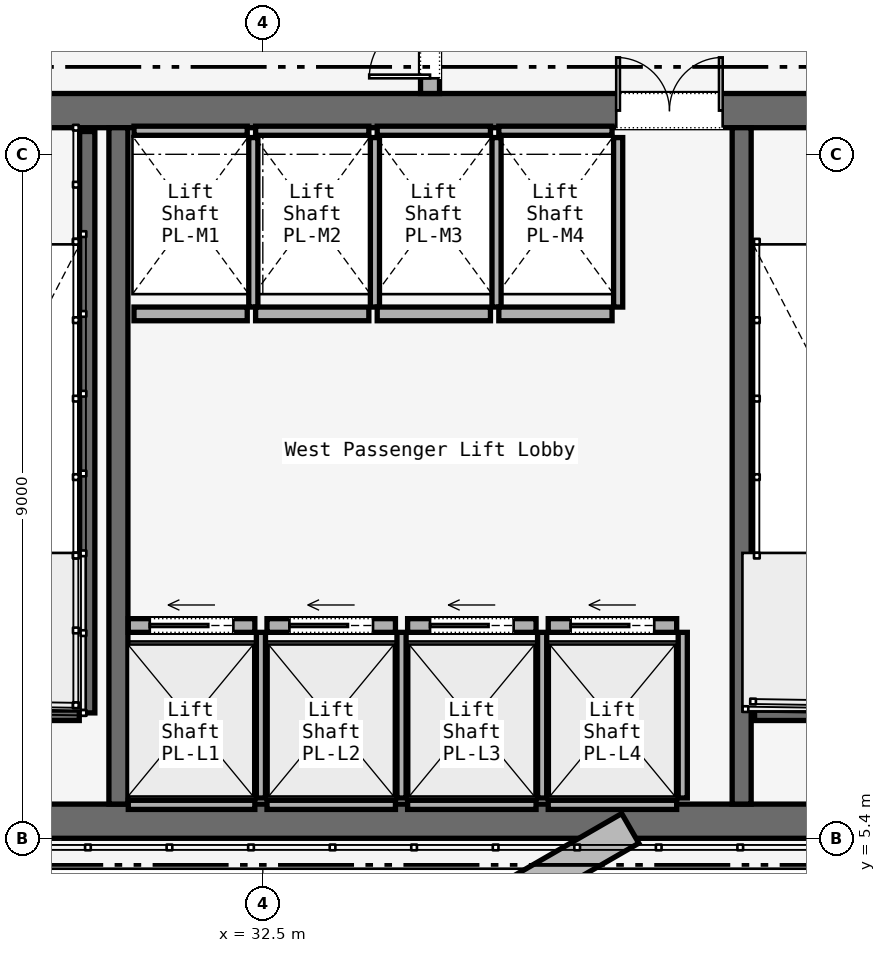
"""IFC4 building model, lengths in metres.
Left out: names, types, materials, properties, quantities, classifications, styles, units other than length and angle.
Written with IfcOpenShell. Run it as: python <this file> out.ifc"""

import sys

from ifc_helpers import new_model, si_unit, direction, frame, frame_2d, origin, place, context, subcontext, project, spatial, rectangle, extrude, element, fill, save


model = new_model("IFC4")
c1 = context("Model", 3, precision=1e-05, world=origin(), true_north=direction((0.0, 1.0)))
c2 = subcontext(c1, "Body", "Model", "MODEL_VIEW")
j1 = project(units=[si_unit("LENGTHUNIT", "METRE"), si_unit("PLANEANGLEUNIT", "RADIAN")], contexts=[c1])
p1 = place(None, origin())
s1 = spatial("IfcSite", under=j1, at=p1, CompositionType="ELEMENT")
p2 = place(p1, origin())
s2 = spatial("IfcBuilding", under=s1, at=p2, CompositionType="ELEMENT")
p3 = place(p2, frame((0.0, 0.0, 112.0)))
s3 = spatial("IfcBuildingStorey", under=s2, at=p3, CompositionType="ELEMENT", Elevation=112.0)
p4 = place(p3, frame((26.45, 14.975, 0.0), z_axis=(0.0, 0.0, 1.0), x_axis=(1.0, 0.0, 0.0)))
e1 = element("IfcWall", 1, at=p4, inside=s3, PredefinedType="SOLIDWALL", context=c2, shape_type="SweptSolid", body=[
    extrude(rectangle(XDim=31.1, YDim=0.45, at=frame_2d((15.55, 0.0))), origin(), (0.0, 0.0, 1.0), 5.12),
])
p5 = place(p4, frame((1.65, 0.0, 0.0)))
e2 = element("IfcOpeningElement", 2, at=p5, cuts=e1, PredefinedType="OPENING", context=c2, shape_type="SweptSolid", body=[
    extrude(rectangle(XDim=1.1, YDim=2.2, at=frame_2d((0.55, 1.1))), frame((0.0, 0.225, 0.0), z_axis=(0.0, -1.0, 0.0), x_axis=(1.0, 0.0, 0.0)), (0.0, 0.0, 1.0), 0.45),
])
p6 = place(p4, frame((13.65, 0.0, 0.0)))
e3 = element("IfcOpeningElement", 3, at=p6, cuts=e1, PredefinedType="OPENING", context=c2, shape_type="SweptSolid", body=[
    extrude(rectangle(XDim=1.1, YDim=2.2, at=frame_2d((0.55, 1.1))), frame((0.0, 0.225, 0.0), z_axis=(0.0, -1.0, 0.0), x_axis=(1.0, 0.0, 0.0)), (0.0, 0.0, 1.0), 0.45),
])
p7 = place(p4, frame((25.55, 0.0, 0.0)))
e4 = element("IfcOpeningElement", 4, at=p7, cuts=e1, PredefinedType="OPENING", context=c2, shape_type="SweptSolid", body=[
    extrude(rectangle(XDim=1.1, YDim=2.2, at=frame_2d((0.55, 1.1))), frame((0.0, 0.225, 0.0), z_axis=(0.0, -1.0, 0.0), x_axis=(1.0, 0.0, 0.0)), (0.0, 0.0, 1.0), 0.45),
])
p8 = place(p4, frame((10.7, 0.0, 0.0)))
e5 = element("IfcOpeningElement", 5, at=p8, cuts=e1, PredefinedType="OPENING", context=c2, shape_type="SweptSolid", body=[
    extrude(rectangle(XDim=1.4, YDim=2.2, at=frame_2d((0.7, 1.1))), frame((0.0, 0.225, 0.0), z_axis=(0.0, -1.0, 0.0), x_axis=(1.0, 0.0, 0.0)), (0.0, 0.0, 1.0), 0.45),
])
p9 = place(p4, frame((19.35, 0.0, 0.0)))
e6 = element("IfcOpeningElement", 6, at=p9, cuts=e1, PredefinedType="OPENING", context=c2, shape_type="SweptSolid", body=[
    extrude(rectangle(XDim=1.1, YDim=2.2, at=frame_2d((0.55, 1.1))), frame((0.0, 0.225, 0.0), z_axis=(0.0, -1.0, 0.0), x_axis=(1.0, 0.0, 0.0)), (0.0, 0.0, 1.0), 0.45),
])
p10 = place(p4, frame((21.4, 0.0, 0.0)))
e7 = element("IfcOpeningElement", 7, at=p10, cuts=e1, PredefinedType="OPENING", context=c2, shape_type="SweptSolid", body=[
    extrude(rectangle(XDim=0.9, YDim=2.1, at=frame_2d((0.45, 1.05))), frame((0.0, 0.225, 0.0), z_axis=(0.0, -1.0, 0.0), x_axis=(1.0, 0.0, 0.0)), (0.0, 0.0, 1.0), 0.45),
])
p11 = place(p4, frame((23.35, 0.0, 0.0)))
e8 = element("IfcOpeningElement", 8, at=p11, cuts=e1, PredefinedType="OPENING", context=c2, shape_type="SweptSolid", body=[
    extrude(rectangle(XDim=1.3, YDim=2.3, at=frame_2d((0.65, 1.15))), frame((0.0, 0.225, 0.0), z_axis=(0.0, -1.0, 0.0), x_axis=(1.0, 0.0, 0.0)), (0.0, 0.0, 1.0), 0.45),
])
p12 = place(p3, frame((26.45, 5.625, 0.0), z_axis=(0.0, 0.0, 1.0), x_axis=(1.0, 0.0, 0.0)))
e9 = element("IfcWall", 9, at=p12, inside=s3, PredefinedType="SOLIDWALL", context=c2, shape_type="SweptSolid", body=[
    extrude(rectangle(XDim=31.1, YDim=0.45, at=frame_2d((15.55, 0.0))), origin(), (0.0, 0.0, 1.0), 5.12),
])
for number, where, z_axis, x_axis in (
    (10, (30.6, 5.85, 0.0), (0.0, 0.0, 1.0), (0.0, 1.0, 0.0)),
    (11, (38.8, 5.85, 0.0), (0.0, 0.0, 1.0), (0.0, 1.0, 0.0)),
):
    element("IfcWall", number, at=place(p3, frame(where, z_axis=z_axis, x_axis=x_axis)), inside=s3, PredefinedType="SOLIDWALL", context=c2, shape_type="SweptSolid", body=[
        extrude(rectangle(XDim=8.9, YDim=0.25, at=frame_2d((4.45, 0.0))), origin(), (0.0, 0.0, 1.0), 5.12),
    ])
p13 = place(p3, frame((34.7, 15.2, 0.0), z_axis=(0.0, 0.0, 1.0), x_axis=(0.0, 1.0, 0.0)))
e12 = element("IfcWall", 12, at=p13, inside=s3, PredefinedType="SOLIDWALL", context=c2, shape_type="SweptSolid", body=[
    extrude(rectangle(XDim=19.8, YDim=0.25, at=frame_2d((9.9, 0.0))), origin(), (0.0, 0.0, 1.0), 3.99),
])
p14 = place(p13, frame((0.2, 0.0, 0.0)))
e13 = element("IfcOpeningElement", 13, at=p14, cuts=e12, PredefinedType="OPENING", context=c2, shape_type="SweptSolid", body=[
    extrude(rectangle(XDim=1.6, YDim=2.3, at=frame_2d((0.8, 1.15))), frame((0.0, 0.125, 0.0), z_axis=(0.0, -1.0, 0.0), x_axis=(1.0, 0.0, 0.0)), (0.0, 0.0, 1.0), 0.25),
])
p15 = place(p3, frame((30.19, 14.7, 0.0), z_axis=(0.0, 0.0, 1.0), x_axis=(0.0, -1.0, 0.0)))
e14 = element("IfcWall", 14, at=p15, inside=s3, PredefinedType="SOLIDWALL", context=c2, shape_type="SweptSolid", body=[
    extrude(rectangle(XDim=7.65, YDim=0.2, at=frame_2d((3.825, 0.0))), origin(), (0.0, 0.0, 1.0), 5.4),
])
for number, where, z_axis, x_axis in (
    (15, (26.97, 7.05, 0.0), (0.0, 0.0, 1.0), (1.0, 0.0, 0.0)),
    (16, (38.97, 7.05, 0.0), (0.0, 0.0, 1.0), (1.0, 0.0, 0.0)),
):
    element("IfcWall", number, at=place(p3, frame(where, z_axis=z_axis, x_axis=x_axis)), inside=s3, PredefinedType="SOLIDWALL", context=c2, shape_type="SweptSolid", body=[
        extrude(rectangle(XDim=3.115, YDim=0.2, at=frame_2d((1.558, 0.0))), origin(), (0.0, 0.0, 1.0), 5.4),
    ])
p16 = place(p3, frame((30.73, 8.2, 0.0), z_axis=(0.0, 0.0, 1.0), x_axis=(1.0, 0.0, 0.0)))
e17 = element("IfcWall", 17, at=p16, inside=s3, PredefinedType="SOLIDWALL", context=c2, shape_type="SweptSolid", body=[
    extrude(rectangle(XDim=1.665, YDim=0.18, at=frame_2d((0.833, 0.0))), origin(), (0.0, 0.0, 1.0), 3.99),
])
p17 = place(p16, frame((0.282, 0.0, 0.0)))
e18 = element("IfcOpeningElement", 18, at=p17, cuts=e17, PredefinedType="OPENING", context=c2, shape_type="SweptSolid", body=[
    extrude(rectangle(XDim=1.1, YDim=2.2, at=frame_2d((0.55, 1.1))), frame((0.0, 0.09, 0.0), z_axis=(0.0, -1.0, 0.0), x_axis=(1.0, 0.0, 0.0)), (0.0, 0.0, 1.0), 0.18),
])
p18 = place(p3, frame((30.73, 5.84, 0.0), z_axis=(0.0, 0.0, 1.0), x_axis=(1.0, 0.0, 0.0)))
e19 = element("IfcWall", 19, at=p18, inside=s3, PredefinedType="SOLIDWALL", context=c2, shape_type="SweptSolid", body=[
    extrude(rectangle(XDim=1.665, YDim=0.12, at=frame_2d((0.833, 0.0))), origin(), (0.0, 0.0, 1.0), 3.99),
])
p19 = place(p3, frame((32.475, 5.93, 0.0), z_axis=(0.0, 0.0, 1.0), x_axis=(0.0, 1.0, 0.0)))
e20 = element("IfcWall", 20, at=p19, inside=s3, PredefinedType="SOLIDWALL", context=c2, shape_type="SweptSolid", body=[
    extrude(rectangle(XDim=2.18, YDim=0.12, at=frame_2d((1.09, 0.0))), origin(), (0.0, 0.0, 1.0), 3.99),
])
p20 = place(p3, frame((32.555, 8.2, 0.0), z_axis=(0.0, 0.0, 1.0), x_axis=(1.0, 0.0, 0.0)))
e21 = element("IfcWall", 21, at=p20, inside=s3, PredefinedType="SOLIDWALL", context=c2, shape_type="SweptSolid", body=[
    extrude(rectangle(XDim=1.69, YDim=0.18, at=frame_2d((0.845, 0.0))), origin(), (0.0, 0.0, 1.0), 3.99),
])
p21 = place(p20, frame((0.295, 0.0, 0.0)))
e22 = element("IfcOpeningElement", 22, at=p21, cuts=e21, PredefinedType="OPENING", context=c2, shape_type="SweptSolid", body=[
    extrude(rectangle(XDim=1.1, YDim=2.2, at=frame_2d((0.55, 1.1))), frame((0.0, 0.09, 0.0), z_axis=(0.0, -1.0, 0.0), x_axis=(1.0, 0.0, 0.0)), (0.0, 0.0, 1.0), 0.18),
])
p22 = place(p3, frame((32.555, 5.84, 0.0), z_axis=(0.0, 0.0, 1.0), x_axis=(1.0, 0.0, 0.0)))
e23 = element("IfcWall", 23, at=p22, inside=s3, PredefinedType="SOLIDWALL", context=c2, shape_type="SweptSolid", body=[
    extrude(rectangle(XDim=1.69, YDim=0.12, at=frame_2d((0.845, 0.0))), origin(), (0.0, 0.0, 1.0), 3.99),
])
p23 = place(p3, frame((34.325, 5.93, 0.0), z_axis=(0.0, 0.0, 1.0), x_axis=(0.0, 1.0, 0.0)))
e24 = element("IfcWall", 24, at=p23, inside=s3, PredefinedType="SOLIDWALL", context=c2, shape_type="SweptSolid", body=[
    extrude(rectangle(XDim=2.18, YDim=0.12, at=frame_2d((1.09, 0.0))), origin(), (0.0, 0.0, 1.0), 3.99),
])
p24 = place(p3, frame((34.405, 8.2, 0.0), z_axis=(0.0, 0.0, 1.0), x_axis=(1.0, 0.0, 0.0)))
e25 = element("IfcWall", 25, at=p24, inside=s3, PredefinedType="SOLIDWALL", context=c2, shape_type="SweptSolid", body=[
    extrude(rectangle(XDim=1.69, YDim=0.18, at=frame_2d((0.845, 0.0))), origin(), (0.0, 0.0, 1.0), 3.99),
])
p25 = place(p24, frame((0.295, 0.0, 0.0)))
e26 = element("IfcOpeningElement", 26, at=p25, cuts=e25, PredefinedType="OPENING", context=c2, shape_type="SweptSolid", body=[
    extrude(rectangle(XDim=1.1, YDim=2.2, at=frame_2d((0.55, 1.1))), frame((0.0, 0.09, 0.0), z_axis=(0.0, -1.0, 0.0), x_axis=(1.0, 0.0, 0.0)), (0.0, 0.0, 1.0), 0.18),
])
p26 = place(p3, frame((34.405, 5.84, 0.0), z_axis=(0.0, 0.0, 1.0), x_axis=(1.0, 0.0, 0.0)))
e27 = element("IfcWall", 27, at=p26, inside=s3, PredefinedType="SOLIDWALL", context=c2, shape_type="SweptSolid", body=[
    extrude(rectangle(XDim=1.69, YDim=0.12, at=frame_2d((0.845, 0.0))), origin(), (0.0, 0.0, 1.0), 3.99),
])
p27 = place(p3, frame((36.175, 5.93, 0.0), z_axis=(0.0, 0.0, 1.0), x_axis=(0.0, 1.0, 0.0)))
e28 = element("IfcWall", 28, at=p27, inside=s3, PredefinedType="SOLIDWALL", context=c2, shape_type="SweptSolid", body=[
    extrude(rectangle(XDim=2.18, YDim=0.12, at=frame_2d((1.09, 0.0))), origin(), (0.0, 0.0, 1.0), 3.99),
])
p28 = place(p3, frame((36.255, 8.2, 0.0), z_axis=(0.0, 0.0, 1.0), x_axis=(1.0, 0.0, 0.0)))
e29 = element("IfcWall", 29, at=p28, inside=s3, PredefinedType="SOLIDWALL", context=c2, shape_type="SweptSolid", body=[
    extrude(rectangle(XDim=1.69, YDim=0.18, at=frame_2d((0.845, 0.0))), origin(), (0.0, 0.0, 1.0), 3.99),
])
p29 = place(p28, frame((0.295, 0.0, 0.0)))
e30 = element("IfcOpeningElement", 30, at=p29, cuts=e29, PredefinedType="OPENING", context=c2, shape_type="SweptSolid", body=[
    extrude(rectangle(XDim=1.1, YDim=2.2, at=frame_2d((0.55, 1.1))), frame((0.0, 0.09, 0.0), z_axis=(0.0, -1.0, 0.0), x_axis=(1.0, 0.0, 0.0)), (0.0, 0.0, 1.0), 0.18),
])
p30 = place(p3, frame((36.255, 5.84, 0.0), z_axis=(0.0, 0.0, 1.0), x_axis=(1.0, 0.0, 0.0)))
e31 = element("IfcWall", 31, at=p30, inside=s3, PredefinedType="SOLIDWALL", context=c2, shape_type="SweptSolid", body=[
    extrude(rectangle(XDim=1.69, YDim=0.12, at=frame_2d((0.845, 0.0))), origin(), (0.0, 0.0, 1.0), 3.99),
])
p31 = place(p3, frame((38.025, 5.93, 0.0), z_axis=(0.0, 0.0, 1.0), x_axis=(0.0, 1.0, 0.0)))
e32 = element("IfcWall", 32, at=p31, inside=s3, PredefinedType="SOLIDWALL", context=c2, shape_type="SweptSolid", body=[
    extrude(rectangle(XDim=2.18, YDim=0.12, at=frame_2d((1.09, 0.0))), origin(), (0.0, 0.0, 1.0), 3.99),
])
p32 = place(p3, frame((30.805, 12.3, 0.0), z_axis=(0.0, 0.0, 1.0), x_axis=(1.0, 0.0, 0.0)))
e33 = element("IfcWall", 33, at=p32, inside=s3, PredefinedType="SOLIDWALL", context=c2, shape_type="SweptSolid", body=[
    extrude(rectangle(XDim=1.49, YDim=0.18, at=frame_2d((0.745, 0.0))), origin(), (0.0, 0.0, 1.0), 3.99),
])
p33 = place(p3, frame((30.805, 14.71, 0.0), z_axis=(0.0, 0.0, 1.0), x_axis=(1.0, 0.0, 0.0)))
e34 = element("IfcWall", 34, at=p33, inside=s3, PredefinedType="SOLIDWALL", context=c2, shape_type="SweptSolid", body=[
    extrude(rectangle(XDim=1.49, YDim=0.12, at=frame_2d((0.745, 0.0))), origin(), (0.0, 0.0, 1.0), 3.99),
])
p34 = place(p3, frame((32.375, 12.39, 0.0), z_axis=(0.0, 0.0, 1.0), x_axis=(0.0, 1.0, 0.0)))
e35 = element("IfcWall", 35, at=p34, inside=s3, PredefinedType="SOLIDWALL", context=c2, shape_type="SweptSolid", body=[
    extrude(rectangle(XDim=2.23, YDim=0.12, at=frame_2d((1.115, 0.0))), origin(), (0.0, 0.0, 1.0), 3.99),
])
p35 = place(p3, frame((32.405, 12.3, 0.0), z_axis=(0.0, 0.0, 1.0), x_axis=(1.0, 0.0, 0.0)))
e36 = element("IfcWall", 36, at=p35, inside=s3, PredefinedType="SOLIDWALL", context=c2, shape_type="SweptSolid", body=[
    extrude(rectangle(XDim=1.49, YDim=0.18, at=frame_2d((0.745, 0.0))), origin(), (0.0, 0.0, 1.0), 3.99),
])
p36 = place(p3, frame((32.405, 14.71, 0.0), z_axis=(0.0, 0.0, 1.0), x_axis=(1.0, 0.0, 0.0)))
e37 = element("IfcWall", 37, at=p36, inside=s3, PredefinedType="SOLIDWALL", context=c2, shape_type="SweptSolid", body=[
    extrude(rectangle(XDim=1.49, YDim=0.12, at=frame_2d((0.745, 0.0))), origin(), (0.0, 0.0, 1.0), 3.99),
])
p37 = place(p3, frame((33.975, 12.39, 0.0), z_axis=(0.0, 0.0, 1.0), x_axis=(0.0, 1.0, 0.0)))
e38 = element("IfcWall", 38, at=p37, inside=s3, PredefinedType="SOLIDWALL", context=c2, shape_type="SweptSolid", body=[
    extrude(rectangle(XDim=2.23, YDim=0.12, at=frame_2d((1.115, 0.0))), origin(), (0.0, 0.0, 1.0), 3.99),
])
p38 = place(p3, frame((34.005, 12.3, 0.0), z_axis=(0.0, 0.0, 1.0), x_axis=(1.0, 0.0, 0.0)))
e39 = element("IfcWall", 39, at=p38, inside=s3, PredefinedType="SOLIDWALL", context=c2, shape_type="SweptSolid", body=[
    extrude(rectangle(XDim=1.49, YDim=0.18, at=frame_2d((0.745, 0.0))), origin(), (0.0, 0.0, 1.0), 3.99),
])
p39 = place(p3, frame((34.005, 14.71, 0.0), z_axis=(0.0, 0.0, 1.0), x_axis=(1.0, 0.0, 0.0)))
e40 = element("IfcWall", 40, at=p39, inside=s3, PredefinedType="SOLIDWALL", context=c2, shape_type="SweptSolid", body=[
    extrude(rectangle(XDim=1.49, YDim=0.12, at=frame_2d((0.745, 0.0))), origin(), (0.0, 0.0, 1.0), 3.99),
])
p40 = place(p3, frame((35.575, 12.39, 0.0), z_axis=(0.0, 0.0, 1.0), x_axis=(0.0, 1.0, 0.0)))
e41 = element("IfcWall", 41, at=p40, inside=s3, PredefinedType="SOLIDWALL", context=c2, shape_type="SweptSolid", body=[
    extrude(rectangle(XDim=2.23, YDim=0.12, at=frame_2d((1.115, 0.0))), origin(), (0.0, 0.0, 1.0), 3.99),
])
p41 = place(p3, frame((35.605, 12.3, 0.0), z_axis=(0.0, 0.0, 1.0), x_axis=(1.0, 0.0, 0.0)))
e42 = element("IfcWall", 42, at=p41, inside=s3, PredefinedType="SOLIDWALL", context=c2, shape_type="SweptSolid", body=[
    extrude(rectangle(XDim=1.49, YDim=0.18, at=frame_2d((0.745, 0.0))), origin(), (0.0, 0.0, 1.0), 3.99),
])
p42 = place(p3, frame((35.605, 14.71, 0.0), z_axis=(0.0, 0.0, 1.0), x_axis=(1.0, 0.0, 0.0)))
e43 = element("IfcWall", 43, at=p42, inside=s3, PredefinedType="SOLIDWALL", context=c2, shape_type="SweptSolid", body=[
    extrude(rectangle(XDim=1.49, YDim=0.12, at=frame_2d((0.745, 0.0))), origin(), (0.0, 0.0, 1.0), 3.99),
])
p43 = place(p3, frame((37.175, 12.39, 0.0), z_axis=(0.0, 0.0, 1.0), x_axis=(0.0, 1.0, 0.0)))
e44 = element("IfcWall", 44, at=p43, inside=s3, PredefinedType="SOLIDWALL", context=c2, shape_type="SweptSolid", body=[
    extrude(rectangle(XDim=2.23, YDim=0.12, at=frame_2d((1.115, 0.0))), origin(), (0.0, 0.0, 1.0), 3.99),
])
p44 = place(p14, origin())
e45 = element("IfcDoor", 45, at=p44, inside=s3, OperationType="DOUBLE_DOOR_SINGLE_SWING", PredefinedType="DOOR", context=c2, shape_type="SweptSolid", body=[
    extrude(rectangle(XDim=1.6, YDim=2.3, at=frame_2d((0.8, 1.15))), frame((0.0, 0.025, 0.0), z_axis=(0.0, -1.0, 0.0), x_axis=(1.0, 0.0, 0.0)), (0.0, 0.0, 1.0), 0.05),
])
fill(e13, e45)
p45 = place(p8, origin())
e46 = element("IfcDoor", 46, at=p45, inside=s3, OperationType="DOUBLE_DOOR_SINGLE_SWING", PredefinedType="DOOR", context=c2, shape_type="SweptSolid", body=[
    extrude(rectangle(XDim=1.4, YDim=2.2, at=frame_2d((0.7, 1.1))), frame((0.0, 0.025, 0.0), z_axis=(0.0, -1.0, 0.0), x_axis=(1.0, 0.0, 0.0)), (0.0, 0.0, 1.0), 0.05),
])
fill(e5, e46)
p46 = place(p17, origin())
e47 = element("IfcDoor", 47, at=p46, inside=s3, OperationType="SLIDING_TO_LEFT", PredefinedType="DOOR", context=c2, shape_type="SweptSolid", body=[
    extrude(rectangle(XDim=1.1, YDim=2.2, at=frame_2d((0.55, 1.1))), frame((0.0, 0.025, 0.0), z_axis=(0.0, -1.0, 0.0), x_axis=(1.0, 0.0, 0.0)), (0.0, 0.0, 1.0), 0.05),
])
fill(e18, e47)
p47 = place(p21, origin())
e48 = element("IfcDoor", 48, at=p47, inside=s3, OperationType="SLIDING_TO_LEFT", PredefinedType="DOOR", context=c2, shape_type="SweptSolid", body=[
    extrude(rectangle(XDim=1.1, YDim=2.2, at=frame_2d((0.55, 1.1))), frame((0.0, 0.025, 0.0), z_axis=(0.0, -1.0, 0.0), x_axis=(1.0, 0.0, 0.0)), (0.0, 0.0, 1.0), 0.05),
])
fill(e22, e48)
p48 = place(p25, origin())
e49 = element("IfcDoor", 49, at=p48, inside=s3, OperationType="SLIDING_TO_LEFT", PredefinedType="DOOR", context=c2, shape_type="SweptSolid", body=[
    extrude(rectangle(XDim=1.1, YDim=2.2, at=frame_2d((0.55, 1.1))), frame((0.0, 0.025, 0.0), z_axis=(0.0, -1.0, 0.0), x_axis=(1.0, 0.0, 0.0)), (0.0, 0.0, 1.0), 0.05),
])
fill(e26, e49)
p49 = place(p29, origin())
e50 = element("IfcDoor", 50, at=p49, inside=s3, OperationType="SLIDING_TO_LEFT", PredefinedType="DOOR", context=c2, shape_type="SweptSolid", body=[
    extrude(rectangle(XDim=1.1, YDim=2.2, at=frame_2d((0.55, 1.1))), frame((0.0, 0.025, 0.0), z_axis=(0.0, -1.0, 0.0), x_axis=(1.0, 0.0, 0.0)), (0.0, 0.0, 1.0), 0.05),
])
fill(e30, e50)
save(model, sys.argv[1])
